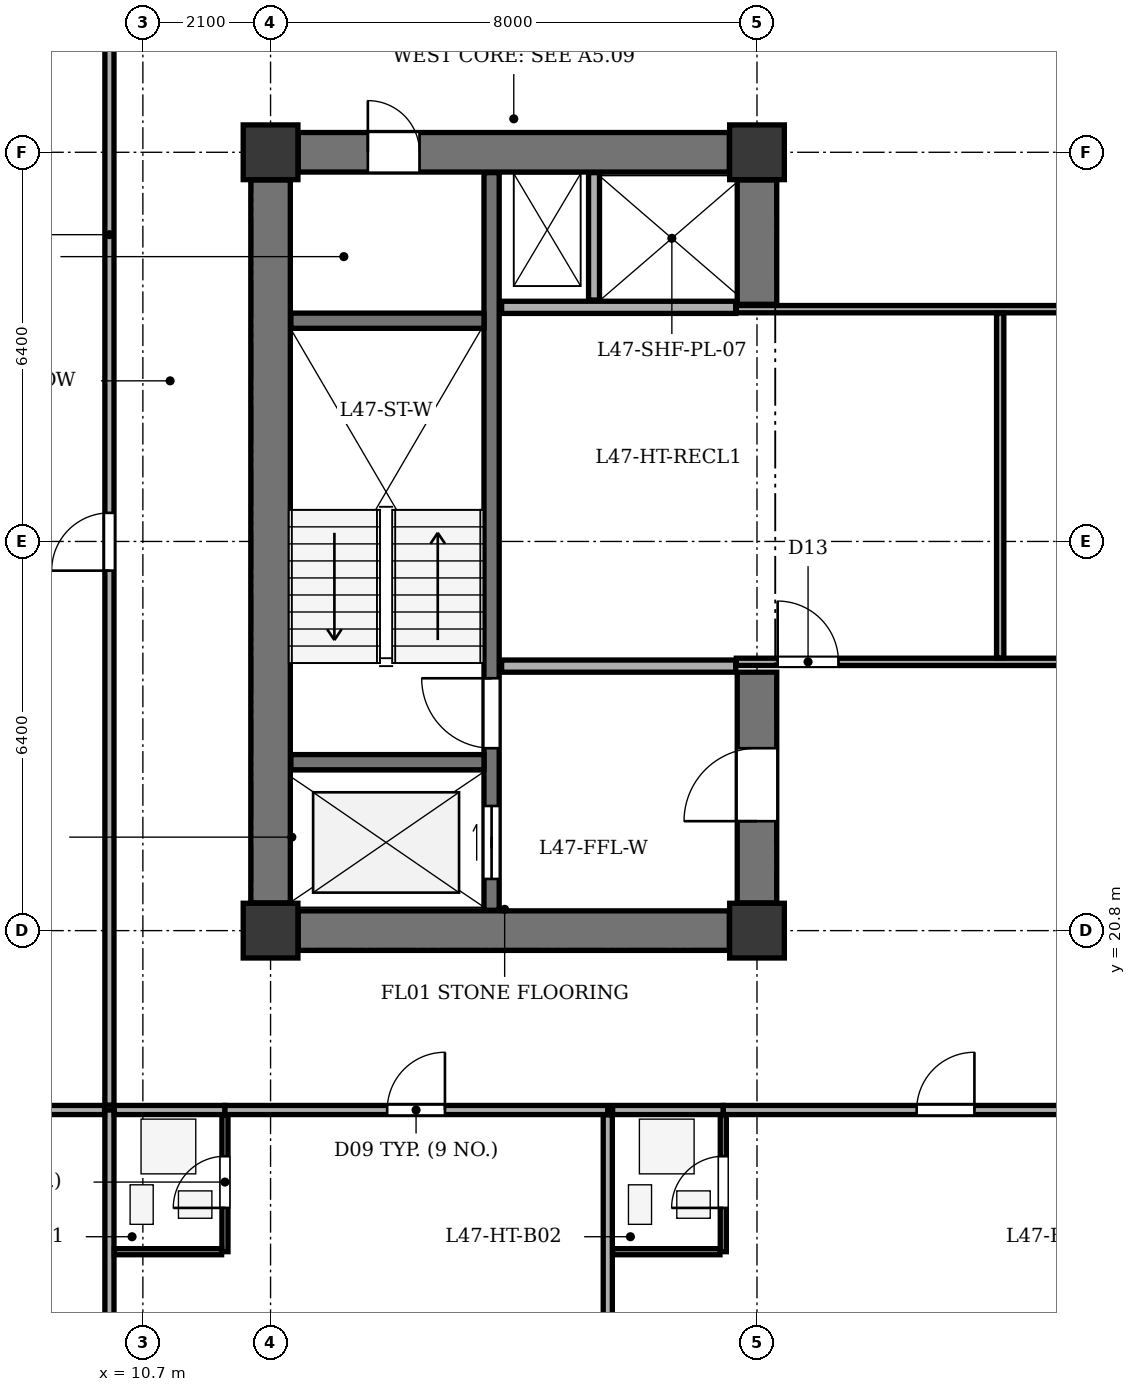
"""IFC4 building model, lengths in metres.
Left out: names, types, materials, properties, quantities, classifications, styles, units other than length and angle.
Written with IfcOpenShell. Run it as: python <this file> out.ifc"""

import sys

from ifc_helpers import new_model, si_unit, direction, frame, frame_2d, origin, origin_2d, place, context, subcontext, project, spatial, rectangle, extrude, element, fill, save


model = new_model("IFC4")
c1 = context("Model", 3, precision=1e-05, world=origin(), true_north=direction((0.0, 1.0)))
c2 = subcontext(c1, "Body", "Model", "MODEL_VIEW")
j1 = project(units=[si_unit("LENGTHUNIT", "METRE"), si_unit("PLANEANGLEUNIT", "RADIAN")], contexts=[c1])
p1 = place(None, origin())
s1 = spatial("IfcSite", under=j1, at=p1, CompositionType="ELEMENT")
p2 = place(p1, origin())
s2 = spatial("IfcBuilding", under=s1, at=p2, CompositionType="ELEMENT")
p3 = place(p2, frame((0.0, 0.0, 183.3)))
s3 = spatial("IfcBuildingStorey", under=s2, at=p3, CompositionType="ELEMENT", Elevation=183.3)
for number, where, z_axis, x_axis in (
    (1, (12.8, 20.8, 0.0), (0.0, 0.0, 1.0), (1.0, 0.0, 0.0)),
    (2, (20.8, 20.8, 0.0), (0.0, 0.0, 1.0), (1.0, 0.0, 0.0)),
    (3, (12.8, 33.6, 0.0), (0.0, 0.0, 1.0), (1.0, 0.0, 0.0)),
    (4, (20.8, 33.6, 0.0), (0.0, 0.0, 1.0), (1.0, 0.0, 0.0)),
):
    element("IfcColumn", number, at=place(p3, frame(where, z_axis=z_axis, x_axis=x_axis)), inside=s3, PredefinedType="COLUMN", context=c2, shape_type="SweptSolid", body=[
        extrude(rectangle(XDim=0.9, YDim=0.9, at=origin_2d()), origin(), (0.0, 0.0, 1.0), 3.5),
    ])
p4 = place(p3, frame((12.8, 21.255, 0.0), z_axis=(0.0, 0.0, 1.0), x_axis=(0.0, 1.0, 0.0)))
e5 = element("IfcWall", 5, at=p4, inside=s3, PredefinedType="SHEAR", context=c2, shape_type="SweptSolid", body=[
    extrude(rectangle(XDim=11.89, YDim=0.65, at=frame_2d((5.945, 0.0))), origin(), (0.0, 0.0, 1.0), 3.2),
])
p5 = place(p3, frame((13.255, 20.8, 0.0), z_axis=(0.0, 0.0, 1.0), x_axis=(1.0, 0.0, 0.0)))
e6 = element("IfcWall", 6, at=p5, inside=s3, PredefinedType="SHEAR", context=c2, shape_type="SweptSolid", body=[
    extrude(rectangle(XDim=7.09, YDim=0.65, at=frame_2d((3.545, 0.0))), origin(), (0.0, 0.0, 1.0), 3.2),
])
p6 = place(p3, frame((13.255, 33.6, 0.0), z_axis=(0.0, 0.0, 1.0), x_axis=(1.0, 0.0, 0.0)))
e7 = element("IfcWall", 7, at=p6, inside=s3, PredefinedType="SHEAR", context=c2, shape_type="SweptSolid", body=[
    extrude(rectangle(XDim=7.09, YDim=0.65, at=frame_2d((3.545, 0.0))), origin(), (0.0, 0.0, 1.0), 3.2),
])
p7 = place(p6, frame((1.145, 0.0, 0.0)))
e8 = element("IfcOpeningElement", 8, at=p7, cuts=e7, PredefinedType="OPENING", context=c2, shape_type="SweptSolid", body=[
    extrude(rectangle(XDim=0.85, YDim=2.02, at=frame_2d((0.425, 1.01))), frame((0.0, 0.335, 0.0), z_axis=(0.0, -1.0, 0.0), x_axis=(1.0, 0.0, 0.0)), (0.0, 0.0, 1.0), 0.67),
])
p8 = place(p3, frame((20.8, 21.255, 0.0), z_axis=(0.0, 0.0, 1.0), x_axis=(0.0, 1.0, 0.0)))
e9 = element("IfcWall", 9, at=p8, inside=s3, PredefinedType="SHEAR", context=c2, shape_type="SweptSolid", body=[
    extrude(rectangle(XDim=3.795, YDim=0.65, at=frame_2d((1.897, 0.0))), origin(), (0.0, 0.0, 1.0), 3.2),
])
p9 = place(p8, frame((1.345, 0.0, 0.0)))
e10 = element("IfcOpeningElement", 10, at=p9, cuts=e9, PredefinedType="OPENING", context=c2, shape_type="SweptSolid", body=[
    extrude(rectangle(XDim=1.2, YDim=2.15, at=frame_2d((0.6, 1.075))), frame((0.0, 0.335, 0.0), z_axis=(0.0, -1.0, 0.0), x_axis=(1.0, 0.0, 0.0)), (0.0, 0.0, 1.0), 0.67),
])
p10 = place(p3, frame((20.8, 31.1, 0.0), z_axis=(0.0, 0.0, 1.0), x_axis=(0.0, 1.0, 0.0)))
e11 = element("IfcWall", 11, at=p10, inside=s3, PredefinedType="SHEAR", context=c2, shape_type="SweptSolid", body=[
    extrude(rectangle(XDim=2.045, YDim=0.65, at=frame_2d((1.022, 0.0))), origin(), (0.0, 0.0, 1.0), 3.2),
])
p11 = place(p3, frame((16.435, 21.135, 0.0), z_axis=(0.0, 0.0, 1.0), x_axis=(0.0, 1.0, 0.0)))
e12 = element("IfcWall", 12, at=p11, inside=s3, PredefinedType="SHEAR", context=c2, shape_type="SweptSolid", body=[
    extrude(rectangle(XDim=12.13, YDim=0.25, at=frame_2d((6.065, 0.0))), origin(), (0.0, 0.0, 1.0), 3.2),
])
p12 = place(p11, frame((0.515, 0.0, 0.0)))
e13 = element("IfcOpeningElement", 13, at=p12, cuts=e12, PredefinedType="OPENING", context=c2, shape_type="SweptSolid", body=[
    extrude(rectangle(XDim=1.2, YDim=2.15, at=frame_2d((0.6, 1.075))), frame((0.0, 0.135, 0.0), z_axis=(0.0, -1.0, 0.0), x_axis=(1.0, 0.0, 0.0)), (0.0, 0.0, 1.0), 0.27),
])
p13 = place(p11, frame((2.665, 0.0, 0.0)))
e14 = element("IfcOpeningElement", 14, at=p13, cuts=e12, PredefinedType="OPENING", context=c2, shape_type="SweptSolid", body=[
    extrude(rectangle(XDim=1.15, YDim=2.15, at=frame_2d((0.575, 1.075))), frame((0.0, 0.135, 0.0), z_axis=(0.0, -1.0, 0.0), x_axis=(1.0, 0.0, 0.0)), (0.0, 0.0, 1.0), 0.27),
])
for number, where, z_axis, x_axis in (
    (15, (13.135, 23.57, 0.0), (0.0, 0.0, 1.0), (1.0, 0.0, 0.0)),
    (16, (13.135, 30.83, 0.0), (0.0, 0.0, 1.0), (1.0, 0.0, 0.0)),
):
    element("IfcWall", number, at=place(p3, frame(where, z_axis=z_axis, x_axis=x_axis)), inside=s3, PredefinedType="SHEAR", context=c2, shape_type="SweptSolid", body=[
        extrude(rectangle(XDim=3.175, YDim=0.25, at=frame_2d((1.587, 0.0))), origin(), (0.0, 0.0, 1.0), 3.2),
    ])
for number, where, z_axis, x_axis in (
    (17, (16.6, 25.15, 0.0), (0.0, 0.0, 1.0), (1.0, 0.0, 0.0)),
    (18, (16.6, 31.05, 0.0), (0.0, 0.0, 1.0), (1.0, 0.0, 0.0)),
):
    element("IfcWall", number, at=place(p3, frame(where, z_axis=z_axis, x_axis=x_axis)), inside=s3, PredefinedType="SOLIDWALL", context=c2, shape_type="SweptSolid", body=[
        extrude(rectangle(XDim=3.85, YDim=0.2, at=frame_2d((1.925, 0.0))), origin(), (0.0, 0.0, 1.0), 3.2),
    ])
p14 = place(p3, frame((18.12, 31.17, 0.0), z_axis=(0.0, 0.0, 1.0), x_axis=(0.0, 1.0, 0.0)))
e19 = element("IfcWall", 19, at=p14, inside=s3, PredefinedType="PARTITIONING", context=c2, shape_type="SweptSolid", body=[
    extrude(rectangle(XDim=2.095, YDim=0.18, at=frame_2d((1.047, 0.0))), origin(), (0.0, 0.0, 1.0), 3.2),
])
p15 = place(p3, frame((20.46, 25.22, 0.0), z_axis=(0.0, 0.0, 1.0), x_axis=(1.0, 0.0, 0.0)))
e20 = element("IfcWall", 20, at=p15, inside=s3, PredefinedType="PARTITIONING", context=c2, shape_type="SweptSolid", body=[
    extrude(rectangle(XDim=11.94, YDim=0.12, at=frame_2d((5.97, 0.0))), origin(), (0.0, 0.0, 1.0), 3.2),
])
p16 = place(p15, frame((0.68, 0.0, 0.0)))
e21 = element("IfcOpeningElement", 21, at=p16, cuts=e20, PredefinedType="OPENING", context=c2, shape_type="SweptSolid", body=[
    extrude(rectangle(XDim=1.0, YDim=2.1, at=frame_2d((0.5, 1.05))), frame((0.0, 0.07, 0.0), z_axis=(0.0, -1.0, 0.0), x_axis=(1.0, 0.0, 0.0)), (0.0, 0.0, 1.0), 0.14),
])
p17 = place(p3, frame((20.46, 31.02, 0.0), z_axis=(0.0, 0.0, 1.0), x_axis=(1.0, 0.0, 0.0)))
e22 = element("IfcWall", 22, at=p17, inside=s3, PredefinedType="PARTITIONING", context=c2, shape_type="SweptSolid", body=[
    extrude(rectangle(XDim=11.94, YDim=0.12, at=frame_2d((5.97, 0.0))), origin(), (0.0, 0.0, 1.0), 3.2),
])
p18 = place(p3, frame((24.8, 25.285, 0.0), z_axis=(0.0, 0.0, 1.0), x_axis=(0.0, 1.0, 0.0)))
e23 = element("IfcWall", 23, at=p18, inside=s3, PredefinedType="PARTITIONING", context=c2, shape_type="SweptSolid", body=[
    extrude(rectangle(XDim=5.67, YDim=0.12, at=frame_2d((2.835, 0.0))), origin(), (0.0, 0.0, 1.0), 3.2),
])
p19 = place(p3, frame((10.15, 8.275, 0.0), z_axis=(0.0, 0.0, 1.0), x_axis=(0.0, 1.0, 0.0)))
e24 = element("IfcWall", 24, at=p19, inside=s3, PredefinedType="PARTITIONING", context=c2, shape_type="SweptSolid", body=[
    extrude(rectangle(XDim=9.575, YDim=0.15, at=frame_2d((4.788, 0.0))), origin(), (0.0, 0.0, 1.0), 3.2),
])
p20 = place(p3, frame((10.23, 17.85, 0.0), z_axis=(0.0, 0.0, 1.0), x_axis=(1.0, 0.0, 0.0)))
e25 = element("IfcWall", 25, at=p20, inside=s3, PredefinedType="PARTITIONING", context=c2, shape_type="SweptSolid", body=[
    extrude(rectangle(XDim=1.82, YDim=0.15, at=frame_2d((0.91, 0.0))), origin(), (0.0, 0.0, 1.0), 3.2),
])
p21 = place(p3, frame((12.05, 17.85, 0.0), z_axis=(0.0, 0.0, 1.0), x_axis=(1.0, 0.0, 0.0)))
e26 = element("IfcWall", 26, at=p21, inside=s3, PredefinedType="PARTITIONING", context=c2, shape_type="SweptSolid", body=[
    extrude(rectangle(XDim=6.296, YDim=0.15, at=frame_2d((3.148, 0.0))), origin(), (0.0, 0.0, 1.0), 3.2),
])
p22 = place(p21, frame((2.668, 0.0, 0.0)))
e27 = element("IfcOpeningElement", 27, at=p22, cuts=e26, PredefinedType="OPENING", context=c2, shape_type="SweptSolid", body=[
    extrude(rectangle(XDim=0.95, YDim=2.1, at=frame_2d((0.475, 1.05))), frame((0.0, 0.085, 0.0), z_axis=(0.0, -1.0, 0.0), x_axis=(1.0, 0.0, 0.0)), (0.0, 0.0, 1.0), 0.17),
])
p23 = place(p3, frame((12.05, 15.52, 0.0), z_axis=(0.0, 0.0, 1.0), x_axis=(0.0, 1.0, 0.0)))
e28 = element("IfcWall", 28, at=p23, inside=s3, PredefinedType="PARTITIONING", context=c2, shape_type="SweptSolid", body=[
    extrude(rectangle(XDim=2.25, YDim=0.1, at=frame_2d((1.125, 0.0))), origin(), (0.0, 0.0, 1.0), 3.2),
])
p24 = place(p23, frame((0.72, 0.0, 0.0)))
e29 = element("IfcOpeningElement", 29, at=p24, cuts=e28, PredefinedType="OPENING", context=c2, shape_type="SweptSolid", body=[
    extrude(rectangle(XDim=0.85, YDim=2.05, at=frame_2d((0.425, 1.025))), frame((0.0, 0.06, 0.0), z_axis=(0.0, -1.0, 0.0), x_axis=(1.0, 0.0, 0.0)), (0.0, 0.0, 1.0), 0.12),
])
p25 = place(p3, frame((10.23, 15.52, 0.0), z_axis=(0.0, 0.0, 1.0), x_axis=(1.0, 0.0, 0.0)))
e30 = element("IfcWall", 30, at=p25, inside=s3, PredefinedType="PARTITIONING", context=c2, shape_type="SweptSolid", body=[
    extrude(rectangle(XDim=1.765, YDim=0.1, at=frame_2d((0.883, 0.0))), origin(), (0.0, 0.0, 1.0), 3.2),
])
p26 = place(p3, frame((18.346, 8.275, 0.0), z_axis=(0.0, 0.0, 1.0), x_axis=(0.0, 1.0, 0.0)))
e31 = element("IfcWall", 31, at=p26, inside=s3, PredefinedType="PARTITIONING", context=c2, shape_type="SweptSolid", body=[
    extrude(rectangle(XDim=9.495, YDim=0.15, at=frame_2d((4.748, 0.0))), origin(), (0.0, 0.0, 1.0), 3.2),
])
p27 = place(p3, frame((18.426, 17.85, 0.0), z_axis=(0.0, 0.0, 1.0), x_axis=(1.0, 0.0, 0.0)))
e32 = element("IfcWall", 32, at=p27, inside=s3, PredefinedType="PARTITIONING", context=c2, shape_type="SweptSolid", body=[
    extrude(rectangle(XDim=1.82, YDim=0.15, at=frame_2d((0.91, 0.0))), origin(), (0.0, 0.0, 1.0), 3.2),
])
p28 = place(p3, frame((20.246, 17.85, 0.0), z_axis=(0.0, 0.0, 1.0), x_axis=(1.0, 0.0, 0.0)))
e33 = element("IfcWall", 33, at=p28, inside=s3, PredefinedType="PARTITIONING", context=c2, shape_type="SweptSolid", body=[
    extrude(rectangle(XDim=7.32, YDim=0.15, at=frame_2d((3.66, 0.0))), origin(), (0.0, 0.0, 1.0), 3.2),
])
p29 = place(p28, frame((3.18, 0.0, 0.0)))
e34 = element("IfcOpeningElement", 34, at=p29, cuts=e33, PredefinedType="OPENING", context=c2, shape_type="SweptSolid", body=[
    extrude(rectangle(XDim=0.95, YDim=2.1, at=frame_2d((0.475, 1.05))), frame((0.0, 0.085, 0.0), z_axis=(0.0, -1.0, 0.0), x_axis=(1.0, 0.0, 0.0)), (0.0, 0.0, 1.0), 0.17),
])
p30 = place(p3, frame((20.246, 15.52, 0.0), z_axis=(0.0, 0.0, 1.0), x_axis=(0.0, 1.0, 0.0)))
e35 = element("IfcWall", 35, at=p30, inside=s3, PredefinedType="PARTITIONING", context=c2, shape_type="SweptSolid", body=[
    extrude(rectangle(XDim=2.25, YDim=0.1, at=frame_2d((1.125, 0.0))), origin(), (0.0, 0.0, 1.0), 3.2),
])
p31 = place(p30, frame((0.72, 0.0, 0.0)))
e36 = element("IfcOpeningElement", 36, at=p31, cuts=e35, PredefinedType="OPENING", context=c2, shape_type="SweptSolid", body=[
    extrude(rectangle(XDim=0.85, YDim=2.05, at=frame_2d((0.425, 1.025))), frame((0.0, 0.06, 0.0), z_axis=(0.0, -1.0, 0.0), x_axis=(1.0, 0.0, 0.0)), (0.0, 0.0, 1.0), 0.12),
])
p32 = place(p3, frame((18.426, 15.52, 0.0), z_axis=(0.0, 0.0, 1.0), x_axis=(1.0, 0.0, 0.0)))
e37 = element("IfcWall", 37, at=p32, inside=s3, PredefinedType="PARTITIONING", context=c2, shape_type="SweptSolid", body=[
    extrude(rectangle(XDim=1.765, YDim=0.1, at=frame_2d((0.882, 0.0))), origin(), (0.0, 0.0, 1.0), 3.2),
])
p33 = place(p3, frame((4.675, 17.85, 0.0), z_axis=(0.0, 0.0, 1.0), x_axis=(1.0, 0.0, 0.0)))
e38 = element("IfcWall", 38, at=p33, inside=s3, PredefinedType="PARTITIONING", context=c2, shape_type="SweptSolid", body=[
    extrude(rectangle(XDim=5.395, YDim=0.15, at=frame_2d((2.698, 0.0))), origin(), (0.0, 0.0, 1.0), 3.2),
])
p34 = place(p3, frame((10.15, 17.93, 0.0), z_axis=(0.0, 0.0, 1.0), x_axis=(0.0, 1.0, 0.0)))
e39 = element("IfcWall", 39, at=p34, inside=s3, PredefinedType="PARTITIONING", context=c2, shape_type="SweptSolid", body=[
    extrude(rectangle(XDim=18.54, YDim=0.15, at=frame_2d((9.27, 0.0))), origin(), (0.0, 0.0, 1.0), 3.2),
])
p35 = place(p34, frame((8.79, 0.0, 0.0)))
e40 = element("IfcOpeningElement", 40, at=p35, cuts=e39, PredefinedType="OPENING", context=c2, shape_type="SweptSolid", body=[
    extrude(rectangle(XDim=0.95, YDim=2.1, at=frame_2d((0.475, 1.05))), frame((0.0, 0.085, 0.0), z_axis=(0.0, -1.0, 0.0), x_axis=(1.0, 0.0, 0.0)), (0.0, 0.0, 1.0), 0.17),
])
p36 = place(p7, origin())
e41 = element("IfcDoor", 41, at=p36, inside=s3, OperationType="SINGLE_SWING_LEFT", PredefinedType="DOOR", context=c2, shape_type="SweptSolid", body=[
    extrude(rectangle(XDim=0.85, YDim=2.02, at=frame_2d((0.425, 1.01))), frame((0.0, 0.025, 0.0), z_axis=(0.0, -1.0, 0.0), x_axis=(1.0, 0.0, 0.0)), (0.0, 0.0, 1.0), 0.05),
])
fill(e8, e41)
p37 = place(p9, origin())
e42 = element("IfcDoor", 42, at=p37, inside=s3, OperationType="SINGLE_SWING_LEFT", PredefinedType="DOOR", context=c2, shape_type="SweptSolid", body=[
    extrude(rectangle(XDim=1.2, YDim=2.15, at=frame_2d((0.6, 1.075))), frame((0.0, 0.025, 0.0), z_axis=(0.0, -1.0, 0.0), x_axis=(1.0, 0.0, 0.0)), (0.0, 0.0, 1.0), 0.05),
])
fill(e10, e42)
p38 = place(p12, origin())
e43 = element("IfcDoor", 43, at=p38, inside=s3, OperationType="DOUBLE_DOOR_SLIDING", PredefinedType="DOOR", context=c2, shape_type="SweptSolid", body=[
    extrude(rectangle(XDim=1.2, YDim=2.15, at=frame_2d((0.6, 1.075))), frame((0.0, 0.025, 0.0), z_axis=(0.0, -1.0, 0.0), x_axis=(1.0, 0.0, 0.0)), (0.0, 0.0, 1.0), 0.05),
])
fill(e13, e43)
p39 = place(p13, origin())
e44 = element("IfcDoor", 44, at=p39, inside=s3, OperationType="SINGLE_SWING_RIGHT", PredefinedType="DOOR", context=c2, shape_type="SweptSolid", body=[
    extrude(rectangle(XDim=1.15, YDim=2.15, at=frame_2d((0.575, 1.075))), frame((0.0, 0.025, 0.0), z_axis=(0.0, -1.0, 0.0), x_axis=(1.0, 0.0, 0.0)), (0.0, 0.0, 1.0), 0.05),
])
fill(e14, e44)
p40 = place(p16, origin())
e45 = element("IfcDoor", 45, at=p40, inside=s3, OperationType="SINGLE_SWING_LEFT", PredefinedType="DOOR", context=c2, shape_type="SweptSolid", body=[
    extrude(rectangle(XDim=1.0, YDim=2.1, at=frame_2d((0.5, 1.05))), frame((0.0, 0.025, 0.0), z_axis=(0.0, -1.0, 0.0), x_axis=(1.0, 0.0, 0.0)), (0.0, 0.0, 1.0), 0.05),
])
fill(e21, e45)
p41 = place(p24, origin())
e46 = element("IfcDoor", 46, at=p41, inside=s3, OperationType="SINGLE_SWING_LEFT", PredefinedType="DOOR", context=c2, shape_type="SweptSolid", body=[
    extrude(rectangle(XDim=0.85, YDim=2.05, at=frame_2d((0.425, 1.025))), frame((0.0, 0.025, 0.0), z_axis=(0.0, -1.0, 0.0), x_axis=(1.0, 0.0, 0.0)), (0.0, 0.0, 1.0), 0.05),
])
fill(e29, e46)
p42 = place(p22, origin())
e47 = element("IfcDoor", 47, at=p42, inside=s3, OperationType="SINGLE_SWING_RIGHT", PredefinedType="DOOR", context=c2, shape_type="SweptSolid", body=[
    extrude(rectangle(XDim=0.95, YDim=2.1, at=frame_2d((0.475, 1.05))), frame((0.0, 0.025, 0.0), z_axis=(0.0, -1.0, 0.0), x_axis=(1.0, 0.0, 0.0)), (0.0, 0.0, 1.0), 0.05),
])
fill(e27, e47)
p43 = place(p31, origin())
e48 = element("IfcDoor", 48, at=p43, inside=s3, OperationType="SINGLE_SWING_LEFT", PredefinedType="DOOR", context=c2, shape_type="SweptSolid", body=[
    extrude(rectangle(XDim=0.85, YDim=2.05, at=frame_2d((0.425, 1.025))), frame((0.0, 0.025, 0.0), z_axis=(0.0, -1.0, 0.0), x_axis=(1.0, 0.0, 0.0)), (0.0, 0.0, 1.0), 0.05),
])
fill(e36, e48)
p44 = place(p29, origin())
e49 = element("IfcDoor", 49, at=p44, inside=s3, OperationType="SINGLE_SWING_RIGHT", PredefinedType="DOOR", context=c2, shape_type="SweptSolid", body=[
    extrude(rectangle(XDim=0.95, YDim=2.1, at=frame_2d((0.475, 1.05))), frame((0.0, 0.025, 0.0), z_axis=(0.0, -1.0, 0.0), x_axis=(1.0, 0.0, 0.0)), (0.0, 0.0, 1.0), 0.05),
])
fill(e34, e49)
p45 = place(p35, origin())
e50 = element("IfcDoor", 50, at=p45, inside=s3, OperationType="SINGLE_SWING_LEFT", PredefinedType="DOOR", context=c2, shape_type="SweptSolid", body=[
    extrude(rectangle(XDim=0.95, YDim=2.1, at=frame_2d((0.475, 1.05))), frame((0.0, 0.025, 0.0), z_axis=(0.0, -1.0, 0.0), x_axis=(1.0, 0.0, 0.0)), (0.0, 0.0, 1.0), 0.05),
])
fill(e40, e50)
save(model, sys.argv[1])
